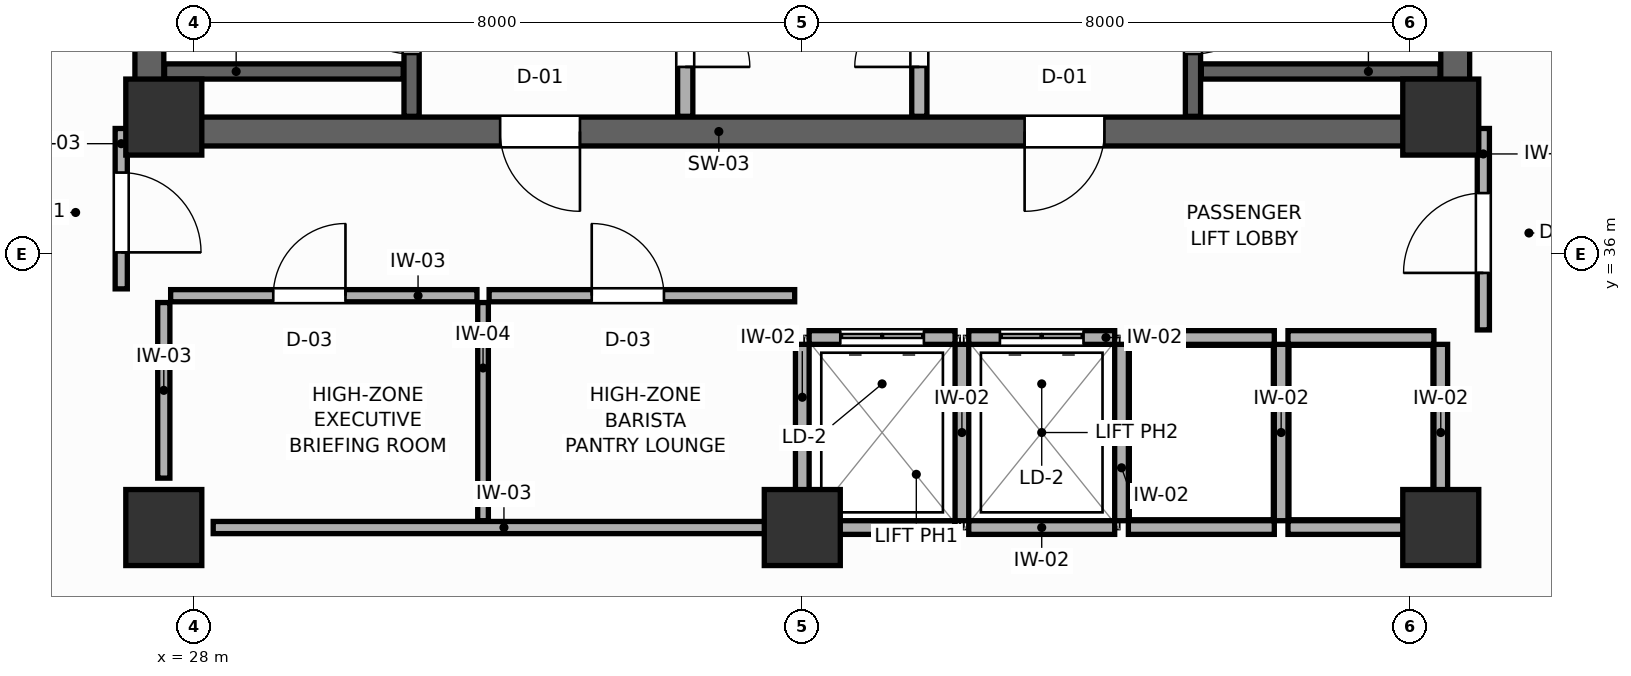
"""IFC4 building model, lengths in metres.
Left out: names, types, materials, properties, quantities, classifications, styles, units other than length and angle.
Written with IfcOpenShell. Run it as: python <this file> out.ifc"""

import sys

from ifc_helpers import new_model, si_unit, direction, frame, frame_2d, origin, origin_2d, place, context, subcontext, project, spatial, rectangle, extrude, source, transform, mapped, element, fill, save


model = new_model("IFC4")
c1 = context("Model", 3, precision=1e-05, world=origin(), true_north=direction((0.0, 1.0)))
c2 = subcontext(c1, "Body", "Model", "MODEL_VIEW")
j1 = project(units=[si_unit("LENGTHUNIT", "METRE"), si_unit("PLANEANGLEUNIT", "RADIAN")], contexts=[c1])
p1 = place(None, origin())
s1 = spatial("IfcSite", under=j1, at=p1, CompositionType="ELEMENT")
p2 = place(p1, origin())
s2 = spatial("IfcBuilding", under=s1, at=p2, CompositionType="ELEMENT")
p3 = place(p2, frame((0.0, 0.0, 205.8)))
s3 = spatial("IfcBuildingStorey", under=s2, at=p3, CompositionType="ELEMENT", Elevation=205.8)
p4 = place(p3, frame((27.22, 37.61, 0.0), z_axis=(0.0, 0.0, 1.0), x_axis=(1.0, 0.0, 0.0)))
e1 = element("IfcWall", 1, at=p4, inside=s3, PredefinedType="SHEAR", context=c2, shape_type="SweptSolid", body=[
    extrude(rectangle(XDim=17.56, YDim=0.38, at=frame_2d((8.78, 0.0))), origin(), (0.0, 0.0, 1.0), 3.6),
])
p5 = place(p4, frame((4.805, 0.0, 0.0)))
e2 = element("IfcOpeningElement", 2, at=p5, cuts=e1, PredefinedType="OPENING", context=c2, shape_type="SweptSolid", body=[
    extrude(rectangle(XDim=1.05, YDim=2.1, at=frame_2d((0.525, 1.05))), frame((0.0, 0.2, 0.0), z_axis=(0.0, -1.0, 0.0), x_axis=(1.0, 0.0, 0.0)), (0.0, 0.0, 1.0), 0.4),
])
p6 = place(p4, frame((11.705, 0.0, 0.0)))
e3 = element("IfcOpeningElement", 3, at=p6, cuts=e1, PredefinedType="OPENING", context=c2, shape_type="SweptSolid", body=[
    extrude(rectangle(XDim=1.05, YDim=2.1, at=frame_2d((0.525, 1.05))), frame((0.0, 0.2, 0.0), z_axis=(0.0, -1.0, 0.0), x_axis=(1.0, 0.0, 0.0)), (0.0, 0.0, 1.0), 0.4),
])
for number, where, z_axis, x_axis in (
    (4, (27.41, 37.8, 0.0), (0.0, 0.0, 1.0), (0.0, 1.0, 0.0)),
    (5, (44.59, 37.8, 0.0), (0.0, 0.0, 1.0), (0.0, 1.0, 0.0)),
):
    element("IfcWall", number, at=place(p3, frame(where, z_axis=z_axis, x_axis=x_axis)), inside=s3, PredefinedType="SHEAR", context=c2, shape_type="SweptSolid", body=[
        extrude(rectangle(XDim=9.0, YDim=0.38, at=frame_2d((4.5, 0.0))), origin(), (0.0, 0.0, 1.0), 3.6),
    ])
m1 = source(origin(), c2, "Body", "SweptSolid", [
    extrude(rectangle(XDim=1.0, YDim=1.0, at=origin_2d()), origin(), (0.0, 0.0, 1.0), 3.6),
])
for number, where, z_axis, x_axis in (
    (6, (27.6, 37.8, 0.0), (0.0, 0.0, 1.0), (1.0, 0.0, 0.0)),
    (7, (44.4, 37.8, 0.0), (0.0, 0.0, 1.0), (1.0, 0.0, 0.0)),
    (8, (27.6, 32.4, 0.0), (0.0, 0.0, 1.0), (1.0, 0.0, 0.0)),
    (9, (44.4, 32.4, 0.0), (0.0, 0.0, 1.0), (1.0, 0.0, 0.0)),
    (10, (36.0, 32.4, 0.0), (0.0, 0.0, 1.0), (1.0, 0.0, 0.0)),
):
    element("IfcColumn", number, at=place(p3, frame(where, z_axis=z_axis, x_axis=x_axis)), inside=s3, PredefinedType="COLUMN", context=c2, shape_type="MappedRepresentation", body=[
        mapped(m1, transform((0.0, 0.0, 0.0), scale=1.0)),
    ])
p7 = place(p3, frame((30.86, 37.81, 0.0), z_axis=(0.0, 0.0, 1.0), x_axis=(0.0, 1.0, 0.0)))
e11 = element("IfcWall", 11, at=p7, inside=s3, PredefinedType="SHEAR", context=c2, shape_type="SweptSolid", body=[
    extrude(rectangle(XDim=8.98, YDim=0.2, at=frame_2d((4.49, 0.0))), origin(), (0.0, 0.0, 1.0), 3.6),
])
p8 = place(p7, frame((0.82, 0.0, 0.0)))
e12 = element("IfcOpeningElement", 12, at=p8, cuts=e11, PredefinedType="OPENING", context=c2, shape_type="SweptSolid", body=[
    extrude(rectangle(XDim=1.05, YDim=2.1, at=frame_2d((0.525, 1.05))), frame((0.0, 0.11, 0.0), z_axis=(0.0, -1.0, 0.0), x_axis=(1.0, 0.0, 0.0)), (0.0, 0.0, 1.0), 0.22),
])
p9 = place(p3, frame((27.61, 38.4, 0.0), z_axis=(0.0, 0.0, 1.0), x_axis=(1.0, 0.0, 0.0)))
e13 = element("IfcWall", 13, at=p9, inside=s3, PredefinedType="SHEAR", context=c2, shape_type="SweptSolid", body=[
    extrude(rectangle(XDim=3.14, YDim=0.2, at=frame_2d((1.57, 0.0))), origin(), (0.0, 0.0, 1.0), 3.6),
])
p10 = place(p3, frame((41.14, 37.81, 0.0), z_axis=(0.0, 0.0, 1.0), x_axis=(0.0, 1.0, 0.0)))
e14 = element("IfcWall", 14, at=p10, inside=s3, PredefinedType="SHEAR", context=c2, shape_type="SweptSolid", body=[
    extrude(rectangle(XDim=8.98, YDim=0.2, at=frame_2d((4.49, 0.0))), origin(), (0.0, 0.0, 1.0), 3.6),
])
p11 = place(p10, frame((0.82, 0.0, 0.0)))
e15 = element("IfcOpeningElement", 15, at=p11, cuts=e14, PredefinedType="OPENING", context=c2, shape_type="SweptSolid", body=[
    extrude(rectangle(XDim=1.05, YDim=2.1, at=frame_2d((0.525, 1.05))), frame((0.0, 0.11, 0.0), z_axis=(0.0, -1.0, 0.0), x_axis=(1.0, 0.0, 0.0)), (0.0, 0.0, 1.0), 0.22),
])
p12 = place(p3, frame((41.25, 38.4, 0.0), z_axis=(0.0, 0.0, 1.0), x_axis=(1.0, 0.0, 0.0)))
e16 = element("IfcWall", 16, at=p12, inside=s3, PredefinedType="SHEAR", context=c2, shape_type="SweptSolid", body=[
    extrude(rectangle(XDim=3.14, YDim=0.2, at=frame_2d((1.57, 0.0))), origin(), (0.0, 0.0, 1.0), 3.6),
])
p13 = place(p3, frame((34.46, 37.81, 0.0), z_axis=(0.0, 0.0, 1.0), x_axis=(0.0, 1.0, 0.0)))
e17 = element("IfcWall", 17, at=p13, inside=s3, PredefinedType="PARTITIONING", context=c2, shape_type="SweptSolid", body=[
    extrude(rectangle(XDim=8.98, YDim=0.2, at=frame_2d((4.49, 0.0))), origin(), (0.0, 0.0, 1.0), 3.41),
])
p14 = place(p13, frame((0.65, 0.0, 0.0)))
e18 = element("IfcOpeningElement", 18, at=p14, cuts=e17, PredefinedType="OPENING", context=c2, shape_type="SweptSolid", body=[
    extrude(rectangle(XDim=0.85, YDim=2.05, at=frame_2d((0.425, 1.025))), frame((0.0, 0.11, 0.0), z_axis=(0.0, -1.0, 0.0), x_axis=(1.0, 0.0, 0.0)), (0.0, 0.0, 1.0), 0.22),
])
p15 = place(p3, frame((37.54, 37.81, 0.0), z_axis=(0.0, 0.0, 1.0), x_axis=(0.0, 1.0, 0.0)))
e19 = element("IfcWall", 19, at=p15, inside=s3, PredefinedType="PARTITIONING", context=c2, shape_type="SweptSolid", body=[
    extrude(rectangle(XDim=8.98, YDim=0.2, at=frame_2d((4.49, 0.0))), origin(), (0.0, 0.0, 1.0), 3.41),
])
p16 = place(p15, frame((0.65, 0.0, 0.0)))
e20 = element("IfcOpeningElement", 20, at=p16, cuts=e19, PredefinedType="OPENING", context=c2, shape_type="SweptSolid", body=[
    extrude(rectangle(XDim=0.85, YDim=2.05, at=frame_2d((0.425, 1.025))), frame((0.0, 0.11, 0.0), z_axis=(0.0, -1.0, 0.0), x_axis=(1.0, 0.0, 0.0)), (0.0, 0.0, 1.0), 0.22),
])
p17 = place(p3, frame((36.09, 34.9, 0.0), z_axis=(0.0, 0.0, 1.0), x_axis=(1.0, 0.0, 0.0)))
e21 = element("IfcWall", 21, at=p17, inside=s3, PredefinedType="PARTITIONING", context=c2, shape_type="SweptSolid", body=[
    extrude(rectangle(XDim=1.92, YDim=0.18, at=frame_2d((0.96, 0.0))), origin(), (0.0, 0.0, 1.0), 3.41),
])
p18 = place(p17, frame((0.41, 0.0, 0.0)))
e22 = element("IfcOpeningElement", 22, at=p18, cuts=e21, PredefinedType="OPENING", context=c2, shape_type="SweptSolid", body=[
    extrude(rectangle(XDim=1.1, YDim=2.1, at=frame_2d((0.55, 1.05))), frame((0.0, 0.1, 0.0), z_axis=(0.0, -1.0, 0.0), x_axis=(1.0, 0.0, 0.0)), (0.0, 0.0, 1.0), 0.2),
])
p19 = place(p3, frame((36.09, 32.4, 0.0), z_axis=(0.0, 0.0, 1.0), x_axis=(1.0, 0.0, 0.0)))
e23 = element("IfcWall", 23, at=p19, inside=s3, PredefinedType="PARTITIONING", context=c2, shape_type="SweptSolid", body=[
    extrude(rectangle(XDim=1.92, YDim=0.18, at=frame_2d((0.96, 0.0))), origin(), (0.0, 0.0, 1.0), 2.96),
])
p20 = place(p3, frame((36.0, 32.49, 0.0), z_axis=(0.0, 0.0, 1.0), x_axis=(0.0, 1.0, 0.0)))
e24 = element("IfcWall", 24, at=p20, inside=s3, PredefinedType="PARTITIONING", context=c2, shape_type="SweptSolid", body=[
    extrude(rectangle(XDim=2.32, YDim=0.18, at=frame_2d((1.16, 0.0))), origin(), (0.0, 0.0, 1.0), 3.41),
])
p21 = place(p3, frame((38.19, 34.9, 0.0), z_axis=(0.0, 0.0, 1.0), x_axis=(1.0, 0.0, 0.0)))
e25 = element("IfcWall", 25, at=p21, inside=s3, PredefinedType="PARTITIONING", context=c2, shape_type="SweptSolid", body=[
    extrude(rectangle(XDim=1.92, YDim=0.18, at=frame_2d((0.96, 0.0))), origin(), (0.0, 0.0, 1.0), 3.41),
])
p22 = place(p21, frame((0.41, 0.0, 0.0)))
e26 = element("IfcOpeningElement", 26, at=p22, cuts=e25, PredefinedType="OPENING", context=c2, shape_type="SweptSolid", body=[
    extrude(rectangle(XDim=1.1, YDim=2.1, at=frame_2d((0.55, 1.05))), frame((0.0, 0.1, 0.0), z_axis=(0.0, -1.0, 0.0), x_axis=(1.0, 0.0, 0.0)), (0.0, 0.0, 1.0), 0.2),
])
p23 = place(p3, frame((38.19, 32.4, 0.0), z_axis=(0.0, 0.0, 1.0), x_axis=(1.0, 0.0, 0.0)))
e27 = element("IfcWall", 27, at=p23, inside=s3, PredefinedType="PARTITIONING", context=c2, shape_type="SweptSolid", body=[
    extrude(rectangle(XDim=1.92, YDim=0.18, at=frame_2d((0.96, 0.0))), origin(), (0.0, 0.0, 1.0), 2.96),
])
p24 = place(p3, frame((38.1, 32.49, 0.0), z_axis=(0.0, 0.0, 1.0), x_axis=(0.0, 1.0, 0.0)))
e28 = element("IfcWall", 28, at=p24, inside=s3, PredefinedType="PARTITIONING", context=c2, shape_type="SweptSolid", body=[
    extrude(rectangle(XDim=2.32, YDim=0.18, at=frame_2d((1.16, 0.0))), origin(), (0.0, 0.0, 1.0), 3.41),
])
p25 = place(p3, frame((40.29, 34.9, 0.0), z_axis=(0.0, 0.0, 1.0), x_axis=(1.0, 0.0, 0.0)))
e29 = element("IfcWall", 29, at=p25, inside=s3, PredefinedType="PARTITIONING", context=c2, shape_type="SweptSolid", body=[
    extrude(rectangle(XDim=1.92, YDim=0.18, at=frame_2d((0.96, 0.0))), origin(), (0.0, 0.0, 1.0), 3.41),
])
p26 = place(p3, frame((40.29, 32.4, 0.0), z_axis=(0.0, 0.0, 1.0), x_axis=(1.0, 0.0, 0.0)))
e30 = element("IfcWall", 30, at=p26, inside=s3, PredefinedType="PARTITIONING", context=c2, shape_type="SweptSolid", body=[
    extrude(rectangle(XDim=1.92, YDim=0.18, at=frame_2d((0.96, 0.0))), origin(), (0.0, 0.0, 1.0), 2.96),
])
p27 = place(p3, frame((40.2, 32.49, 0.0), z_axis=(0.0, 0.0, 1.0), x_axis=(0.0, 1.0, 0.0)))
e31 = element("IfcWall", 31, at=p27, inside=s3, PredefinedType="PARTITIONING", context=c2, shape_type="SweptSolid", body=[
    extrude(rectangle(XDim=2.32, YDim=0.18, at=frame_2d((1.16, 0.0))), origin(), (0.0, 0.0, 1.0), 3.41),
])
p28 = place(p3, frame((42.39, 34.9, 0.0), z_axis=(0.0, 0.0, 1.0), x_axis=(1.0, 0.0, 0.0)))
e32 = element("IfcWall", 32, at=p28, inside=s3, PredefinedType="PARTITIONING", context=c2, shape_type="SweptSolid", body=[
    extrude(rectangle(XDim=1.92, YDim=0.18, at=frame_2d((0.96, 0.0))), origin(), (0.0, 0.0, 1.0), 3.41),
])
p29 = place(p3, frame((42.39, 32.4, 0.0), z_axis=(0.0, 0.0, 1.0), x_axis=(1.0, 0.0, 0.0)))
e33 = element("IfcWall", 33, at=p29, inside=s3, PredefinedType="PARTITIONING", context=c2, shape_type="SweptSolid", body=[
    extrude(rectangle(XDim=1.92, YDim=0.18, at=frame_2d((0.96, 0.0))), origin(), (0.0, 0.0, 1.0), 2.96),
])
for number, where, z_axis, x_axis in (
    (34, (42.3, 32.49, 0.0), (0.0, 0.0, 1.0), (0.0, 1.0, 0.0)),
    (35, (44.4, 32.49, 0.0), (0.0, 0.0, 1.0), (0.0, 1.0, 0.0)),
):
    element("IfcWall", number, at=place(p3, frame(where, z_axis=z_axis, x_axis=x_axis)), inside=s3, PredefinedType="PARTITIONING", context=c2, shape_type="SweptSolid", body=[
        extrude(rectangle(XDim=2.32, YDim=0.18, at=frame_2d((1.16, 0.0))), origin(), (0.0, 0.0, 1.0), 3.41),
    ])
p30 = place(p3, frame((28.25, 32.4, 0.0), z_axis=(0.0, 0.0, 1.0), x_axis=(1.0, 0.0, 0.0)))
e36 = element("IfcWall", 36, at=p30, inside=s3, PredefinedType="PARTITIONING", context=c2, shape_type="SweptSolid", body=[
    extrude(rectangle(XDim=7.65, YDim=0.16, at=frame_2d((3.825, 0.0))), origin(), (0.0, 0.0, 1.0), 2.96),
])
p31 = place(p3, frame((27.6, 33.05, 0.0), z_axis=(0.0, 0.0, 1.0), x_axis=(0.0, 1.0, 0.0)))
e37 = element("IfcWall", 37, at=p31, inside=s3, PredefinedType="PARTITIONING", context=c2, shape_type="SweptSolid", body=[
    extrude(rectangle(XDim=2.31, YDim=0.16, at=frame_2d((1.155, 0.0))), origin(), (0.0, 0.0, 1.0), 3.41),
])
p32 = place(p3, frame((31.8, 32.49, 0.0), z_axis=(0.0, 0.0, 1.0), x_axis=(0.0, 1.0, 0.0)))
e38 = element("IfcWall", 38, at=p32, inside=s3, PredefinedType="PARTITIONING", context=c2, shape_type="SweptSolid", body=[
    extrude(rectangle(XDim=2.87, YDim=0.14, at=frame_2d((1.435, 0.0))), origin(), (0.0, 0.0, 1.0), 3.41),
])
p33 = place(p3, frame((27.69, 35.45, 0.0), z_axis=(0.0, 0.0, 1.0), x_axis=(1.0, 0.0, 0.0)))
e39 = element("IfcWall", 39, at=p33, inside=s3, PredefinedType="PARTITIONING", context=c2, shape_type="SweptSolid", body=[
    extrude(rectangle(XDim=4.03, YDim=0.16, at=frame_2d((2.015, 0.0))), origin(), (0.0, 0.0, 1.0), 3.41),
])
p34 = place(p33, frame((1.35, 0.0, 0.0)))
e40 = element("IfcOpeningElement", 40, at=p34, cuts=e39, PredefinedType="OPENING", context=c2, shape_type="SweptSolid", body=[
    extrude(rectangle(XDim=0.95, YDim=2.05, at=frame_2d((0.475, 1.025))), frame((0.0, 0.09, 0.0), z_axis=(0.0, -1.0, 0.0), x_axis=(1.0, 0.0, 0.0)), (0.0, 0.0, 1.0), 0.18),
])
p35 = place(p3, frame((31.88, 35.45, 0.0), z_axis=(0.0, 0.0, 1.0), x_axis=(1.0, 0.0, 0.0)))
e41 = element("IfcWall", 41, at=p35, inside=s3, PredefinedType="PARTITIONING", context=c2, shape_type="SweptSolid", body=[
    extrude(rectangle(XDim=4.02, YDim=0.16, at=frame_2d((2.01, 0.0))), origin(), (0.0, 0.0, 1.0), 3.41),
])
p36 = place(p35, frame((1.35, 0.0, 0.0)))
e42 = element("IfcOpeningElement", 42, at=p36, cuts=e41, PredefinedType="OPENING", context=c2, shape_type="SweptSolid", body=[
    extrude(rectangle(XDim=0.95, YDim=2.05, at=frame_2d((0.475, 1.025))), frame((0.0, 0.09, 0.0), z_axis=(0.0, -1.0, 0.0), x_axis=(1.0, 0.0, 0.0)), (0.0, 0.0, 1.0), 0.18),
])
p37 = place(p3, frame((27.04, 35.54, 0.0), z_axis=(0.0, 0.0, 1.0), x_axis=(0.0, 1.0, 0.0)))
e43 = element("IfcWall", 43, at=p37, inside=s3, PredefinedType="PARTITIONING", context=c2, shape_type="SweptSolid", body=[
    extrude(rectangle(XDim=2.11, YDim=0.16, at=frame_2d((1.055, 0.0))), origin(), (0.0, 0.0, 1.0), 3.41),
])
p38 = place(p37, frame((0.48, 0.0, 0.0)))
e44 = element("IfcOpeningElement", 44, at=p38, cuts=e43, PredefinedType="OPENING", context=c2, shape_type="SweptSolid", body=[
    extrude(rectangle(XDim=1.05, YDim=2.1, at=frame_2d((0.525, 1.05))), frame((0.0, 0.09, 0.0), z_axis=(0.0, -1.0, 0.0), x_axis=(1.0, 0.0, 0.0)), (0.0, 0.0, 1.0), 0.18),
])
p39 = place(p3, frame((44.96, 35.0, 0.0), z_axis=(0.0, 0.0, 1.0), x_axis=(0.0, 1.0, 0.0)))
e45 = element("IfcWall", 45, at=p39, inside=s3, PredefinedType="PARTITIONING", context=c2, shape_type="SweptSolid", body=[
    extrude(rectangle(XDim=2.65, YDim=0.16, at=frame_2d((1.325, 0.0))), origin(), (0.0, 0.0, 1.0), 3.41),
])
p40 = place(p39, frame((0.75, 0.0, 0.0)))
e46 = element("IfcOpeningElement", 46, at=p40, cuts=e45, PredefinedType="OPENING", context=c2, shape_type="SweptSolid", body=[
    extrude(rectangle(XDim=1.05, YDim=2.1, at=frame_2d((0.525, 1.05))), frame((0.0, 0.09, 0.0), z_axis=(0.0, -1.0, 0.0), x_axis=(1.0, 0.0, 0.0)), (0.0, 0.0, 1.0), 0.18),
])
p41 = place(p8, origin())
e47 = element("IfcDoor", 47, at=p41, inside=s3, OperationType="SINGLE_SWING_RIGHT", PredefinedType="DOOR", context=c2, shape_type="SweptSolid", body=[
    extrude(rectangle(XDim=1.05, YDim=2.1, at=frame_2d((0.525, 1.05))), frame((0.0, 0.025, 0.0), z_axis=(0.0, -1.0, 0.0), x_axis=(1.0, 0.0, 0.0)), (0.0, 0.0, 1.0), 0.05),
])
fill(e12, e47)
p42 = place(p11, frame((1.05, 0.0, 0.0), z_axis=(0.0, 0.0, 1.0), x_axis=(-1.0, 0.0, 0.0)))
e48 = element("IfcDoor", 48, at=p42, inside=s3, OperationType="SINGLE_SWING_LEFT", PredefinedType="DOOR", context=c2, shape_type="SweptSolid", body=[
    extrude(rectangle(XDim=1.05, YDim=2.1, at=frame_2d((0.525, 1.05))), frame((0.0, 0.025, 0.0), z_axis=(0.0, -1.0, 0.0), x_axis=(1.0, 0.0, 0.0)), (0.0, 0.0, 1.0), 0.05),
])
fill(e15, e48)
p43 = place(p14, frame((0.85, 0.0, 0.0), z_axis=(0.0, 0.0, 1.0), x_axis=(-1.0, 0.0, 0.0)))
e49 = element("IfcDoor", 49, at=p43, inside=s3, OperationType="SINGLE_SWING_RIGHT", PredefinedType="DOOR", context=c2, shape_type="SweptSolid", body=[
    extrude(rectangle(XDim=0.85, YDim=2.05, at=frame_2d((0.425, 1.025))), frame((0.0, 0.025, 0.0), z_axis=(0.0, -1.0, 0.0), x_axis=(1.0, 0.0, 0.0)), (0.0, 0.0, 1.0), 0.05),
])
fill(e18, e49)
p44 = place(p16, origin())
e50 = element("IfcDoor", 50, at=p44, inside=s3, OperationType="SINGLE_SWING_LEFT", PredefinedType="DOOR", context=c2, shape_type="SweptSolid", body=[
    extrude(rectangle(XDim=0.85, YDim=2.05, at=frame_2d((0.425, 1.025))), frame((0.0, 0.025, 0.0), z_axis=(0.0, -1.0, 0.0), x_axis=(1.0, 0.0, 0.0)), (0.0, 0.0, 1.0), 0.05),
])
fill(e20, e50)
p45 = place(p18, origin())
e51 = element("IfcDoor", 51, at=p45, inside=s3, OperationType="DOUBLE_DOOR_SLIDING", PredefinedType="DOOR", context=c2, shape_type="SweptSolid", body=[
    extrude(rectangle(XDim=1.1, YDim=2.1, at=frame_2d((0.55, 1.05))), frame((0.0, 0.025, 0.0), z_axis=(0.0, -1.0, 0.0), x_axis=(1.0, 0.0, 0.0)), (0.0, 0.0, 1.0), 0.05),
])
fill(e22, e51)
p46 = place(p22, origin())
e52 = element("IfcDoor", 52, at=p46, inside=s3, OperationType="DOUBLE_DOOR_SLIDING", PredefinedType="DOOR", context=c2, shape_type="SweptSolid", body=[
    extrude(rectangle(XDim=1.1, YDim=2.1, at=frame_2d((0.55, 1.05))), frame((0.0, 0.025, 0.0), z_axis=(0.0, -1.0, 0.0), x_axis=(1.0, 0.0, 0.0)), (0.0, 0.0, 1.0), 0.05),
])
fill(e26, e52)
p47 = place(p34, origin())
e53 = element("IfcDoor", 53, at=p47, inside=s3, OperationType="SINGLE_SWING_RIGHT", PredefinedType="DOOR", context=c2, shape_type="SweptSolid", body=[
    extrude(rectangle(XDim=0.95, YDim=2.05, at=frame_2d((0.475, 1.025))), frame((0.0, 0.025, 0.0), z_axis=(0.0, -1.0, 0.0), x_axis=(1.0, 0.0, 0.0)), (0.0, 0.0, 1.0), 0.05),
])
fill(e40, e53)
p48 = place(p36, origin())
e54 = element("IfcDoor", 54, at=p48, inside=s3, OperationType="SINGLE_SWING_LEFT", PredefinedType="DOOR", context=c2, shape_type="SweptSolid", body=[
    extrude(rectangle(XDim=0.95, YDim=2.05, at=frame_2d((0.475, 1.025))), frame((0.0, 0.025, 0.0), z_axis=(0.0, -1.0, 0.0), x_axis=(1.0, 0.0, 0.0)), (0.0, 0.0, 1.0), 0.05),
])
fill(e42, e54)
p49 = place(p38, frame((1.05, 0.0, 0.0), z_axis=(0.0, 0.0, 1.0), x_axis=(-1.0, 0.0, 0.0)))
e55 = element("IfcDoor", 55, at=p49, inside=s3, OperationType="SINGLE_SWING_RIGHT", PredefinedType="DOOR", context=c2, shape_type="SweptSolid", body=[
    extrude(rectangle(XDim=1.05, YDim=2.1, at=frame_2d((0.525, 1.05))), frame((0.0, 0.025, 0.0), z_axis=(0.0, -1.0, 0.0), x_axis=(1.0, 0.0, 0.0)), (0.0, 0.0, 1.0), 0.05),
])
fill(e44, e55)
p50 = place(p40, origin())
e56 = element("IfcDoor", 56, at=p50, inside=s3, OperationType="SINGLE_SWING_LEFT", PredefinedType="DOOR", context=c2, shape_type="SweptSolid", body=[
    extrude(rectangle(XDim=1.05, YDim=2.1, at=frame_2d((0.525, 1.05))), frame((0.0, 0.025, 0.0), z_axis=(0.0, -1.0, 0.0), x_axis=(1.0, 0.0, 0.0)), (0.0, 0.0, 1.0), 0.05),
])
fill(e46, e56)
p51 = place(p5, frame((1.05, 0.0, 0.0), z_axis=(0.0, 0.0, 1.0), x_axis=(-1.0, 0.0, 0.0)))
e57 = element("IfcDoor", 57, at=p51, inside=s3, OperationType="SINGLE_SWING_LEFT", PredefinedType="DOOR", context=c2, shape_type="SweptSolid", body=[
    extrude(rectangle(XDim=1.05, YDim=2.1, at=frame_2d((0.525, 1.05))), frame((0.0, 0.025, 0.0), z_axis=(0.0, -1.0, 0.0), x_axis=(1.0, 0.0, 0.0)), (0.0, 0.0, 1.0), 0.05),
])
fill(e2, e57)
p52 = place(p6, frame((1.05, 0.0, 0.0), z_axis=(0.0, 0.0, 1.0), x_axis=(-1.0, 0.0, 0.0)))
e58 = element("IfcDoor", 58, at=p52, inside=s3, OperationType="SINGLE_SWING_RIGHT", PredefinedType="DOOR", context=c2, shape_type="SweptSolid", body=[
    extrude(rectangle(XDim=1.05, YDim=2.1, at=frame_2d((0.525, 1.05))), frame((0.0, 0.025, 0.0), z_axis=(0.0, -1.0, 0.0), x_axis=(1.0, 0.0, 0.0)), (0.0, 0.0, 1.0), 0.05),
])
fill(e3, e58)
save(model, sys.argv[1])
